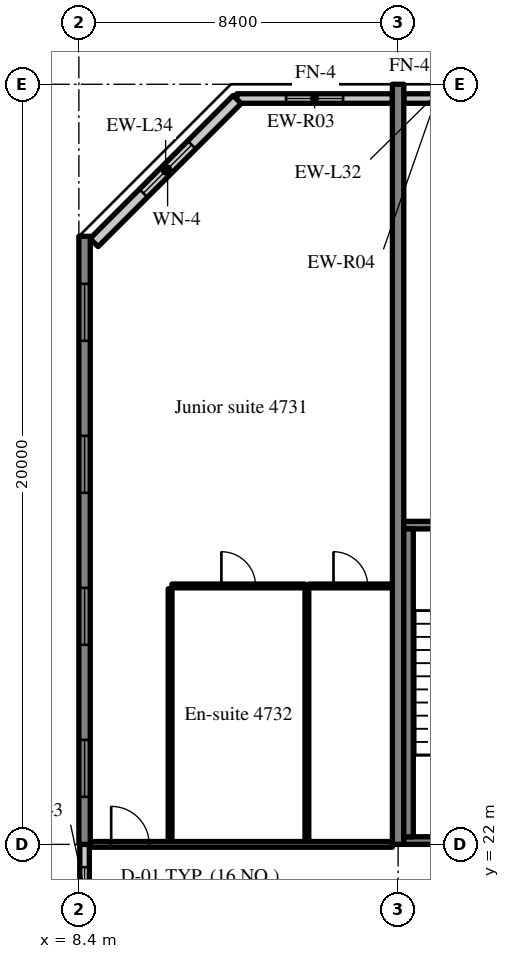
"""IFC4 building model, lengths in metres.
Left out: names, types, materials, properties, quantities, classifications, styles, units other than length and angle.
Written with IfcOpenShell. Run it as: python <this file> out.ifc"""

import sys

from ifc_helpers import new_model, si_unit, direction, frame, frame_2d, origin, place, context, subcontext, project, spatial, rectangle, extrude, source, transform, mapped, element, fill, save


model = new_model("IFC4")
c1 = context("Model", 3, precision=1e-05, world=origin(), true_north=direction((0.0, 1.0)))
c2 = subcontext(c1, "Body", "Model", "MODEL_VIEW")
j1 = project(units=[si_unit("LENGTHUNIT", "METRE"), si_unit("PLANEANGLEUNIT", "RADIAN")], contexts=[c1])
p1 = place(None, origin())
s1 = spatial("IfcSite", under=j1, at=p1, CompositionType="ELEMENT")
p2 = place(p1, origin())
s2 = spatial("IfcBuilding", under=s1, at=p2, CompositionType="ELEMENT")
p3 = place(p2, frame((0.0, 0.0, 193.4)))
s3 = spatial("IfcBuildingStorey", under=s2, at=p3, CompositionType="ELEMENT", Elevation=193.4)
m1 = source(origin(), c2, "Body", "SweptSolid", [
    extrude(rectangle(XDim=16.0, YDim=0.3, at=frame_2d((8.0, 0.0))), origin(), (0.0, 0.0, 1.0), 3.52),
])
p4 = place(p3, frame((8.55, 22.0, 0.0), z_axis=(0.0, 0.0, 1.0), x_axis=(0.0, 1.0, 0.0)))
e1 = element("IfcWall", 1, at=p4, inside=s3, PredefinedType="SHEAR", context=c2, shape_type="MappedRepresentation", body=[
    mapped(m1, transform((0.0, 0.0, 0.0), scale=1.0)),
])
m2 = source(origin(), c2, "Body", "SweptSolid", [
    extrude(rectangle(XDim=1.5, YDim=1.5, at=frame_2d((0.75, 0.75))), frame((0.0, 0.16, 0.0), z_axis=(0.0, -1.0, 0.0), x_axis=(1.0, 0.0, 0.0)), (0.0, 0.0, 1.0), 0.32),
])
p5 = place(p4, frame((1.25, 0.0, 0.9)))
e2 = element("IfcOpeningElement", 2, at=p5, cuts=e1, PredefinedType="OPENING", context=c2, shape_type="MappedRepresentation", body=[
    mapped(m2, transform((0.0, 0.0, 0.0), scale=1.0)),
])
p6 = place(p4, frame((5.25, 0.0, 0.9)))
e3 = element("IfcOpeningElement", 3, at=p6, cuts=e1, PredefinedType="OPENING", context=c2, shape_type="MappedRepresentation", body=[
    mapped(m2, transform((0.0, 0.0, 0.0), scale=1.0)),
])
p7 = place(p4, frame((9.25, 0.0, 0.9)))
e4 = element("IfcOpeningElement", 4, at=p7, cuts=e1, PredefinedType="OPENING", context=c2, shape_type="MappedRepresentation", body=[
    mapped(m2, transform((0.0, 0.0, 0.0), scale=1.0)),
])
p8 = place(p4, frame((13.25, 0.0, 0.9)))
e5 = element("IfcOpeningElement", 5, at=p8, cuts=e1, PredefinedType="OPENING", context=c2, shape_type="MappedRepresentation", body=[
    mapped(m2, transform((0.0, 0.0, 0.0), scale=1.0)),
])
m3 = source(origin(), c2, "Body", "SweptSolid", [
    extrude(rectangle(XDim=20.0, YDim=0.3, at=frame_2d((10.0, 0.0))), origin(), (0.0, 0.0, 1.0), 3.52),
])
p9 = place(p3, frame((16.8, 22.0, 0.0), z_axis=(0.0, 0.0, 1.0), x_axis=(0.0, 1.0, 0.0)))
e6 = element("IfcWall", 6, at=p9, inside=s3, PredefinedType="SHEAR", context=c2, shape_type="MappedRepresentation", body=[
    mapped(m3, transform((0.0, 0.0, 0.0), scale=1.0)),
])
m4 = source(origin(), c2, "Body", "SweptSolid", [
    extrude(rectangle(XDim=4.094, YDim=0.25, at=frame_2d((2.047, 0.0))), origin(), (0.0, 0.0, 1.0), 2.87),
])
p10 = place(p3, frame((16.65, 41.625, 0.0), z_axis=(0.0, 0.0, 1.0), x_axis=(-1.0, 0.0, 0.0)))
e7 = element("IfcWall", 7, at=p10, inside=s3, PredefinedType="SOLIDWALL", context=c2, shape_type="MappedRepresentation", body=[
    mapped(m4, transform((0.0, 0.0, 0.0), scale=1.0)),
])
m5 = source(origin(), c2, "Body", "SweptSolid", [
    extrude(rectangle(XDim=1.5, YDim=1.5, at=frame_2d((0.75, 0.75))), frame((0.0, 0.135, 0.0), z_axis=(0.0, -1.0, 0.0), x_axis=(1.0, 0.0, 0.0)), (0.0, 0.0, 1.0), 0.27),
])
p11 = place(p10, frame((1.297, 0.0, 0.9)))
e8 = element("IfcOpeningElement", 8, at=p11, cuts=e7, PredefinedType="OPENING", context=c2, shape_type="MappedRepresentation", body=[
    mapped(m5, transform((0.0, 0.0, 0.0), scale=1.0)),
])
m6 = source(origin(), c2, "Body", "SweptSolid", [
    extrude(rectangle(XDim=1.708, YDim=0.25, at=frame_2d((0.854, 0.0))), origin(), (0.0, 0.0, 1.0), 2.87),
])
p12 = place(p3, frame((18.658, 41.625, 0.0), z_axis=(0.0, 0.0, 1.0), x_axis=(-1.0, 0.0, 0.0)))
e9 = element("IfcWall", 9, at=p12, inside=s3, PredefinedType="SOLIDWALL", context=c2, shape_type="MappedRepresentation", body=[
    mapped(m6, transform((0.0, 0.0, 0.0), scale=1.0)),
])
m7 = source(origin(), c2, "Body", "SweptSolid", [
    extrude(rectangle(XDim=5.326, YDim=0.3, at=frame_2d((2.663, 0.0))), origin(), (0.0, 0.0, 1.0), 3.52),
])
p13 = place(p3, frame((12.566, 41.6, 0.0), z_axis=(0.0, 0.0, 1.0), x_axis=(-0.707083859269, -0.707129702361, 0.0)))
e10 = element("IfcWall", 10, at=p13, inside=s3, PredefinedType="SOLIDWALL", context=c2, shape_type="MappedRepresentation", body=[
    mapped(m7, transform((0.0, 0.0, 0.0), scale=1.0)),
])
m8 = source(origin(), c2, "Body", "SweptSolid", [
    extrude(rectangle(XDim=1.8, YDim=1.5, at=frame_2d((0.9, 0.75))), frame((0.0, 0.16, 0.0), z_axis=(0.0, -1.0, 0.0), x_axis=(1.0, 0.0, 0.0)), (0.0, 0.0, 1.0), 0.32),
])
p14 = place(p13, frame((1.689, 0.0, 0.9)))
e11 = element("IfcOpeningElement", 11, at=p14, cuts=e10, PredefinedType="OPENING", context=c2, shape_type="MappedRepresentation", body=[
    mapped(m8, transform((0.0, 0.0, 0.0), scale=1.0)),
])
m9 = source(origin(), c2, "Body", "SweptSolid", [
    extrude(rectangle(XDim=2.4, YDim=0.25, at=frame_2d((1.2, 0.0))), origin(), (0.0, 0.0, 1.0), 2.62),
])
p15 = place(p3, frame((8.55, 19.6, 0.0), z_axis=(0.0, 0.0, 1.0), x_axis=(0.0, 1.0, 0.0)))
e12 = element("IfcWall", 12, at=p15, inside=s3, PredefinedType="SOLIDWALL", context=c2, shape_type="MappedRepresentation", body=[
    mapped(m9, transform((0.0, 0.0, 0.0), scale=1.0)),
])
m10 = source(origin(), c2, "Body", "SweptSolid", [
    extrude(rectangle(XDim=1.2, YDim=1.5, at=frame_2d((0.6, 0.75))), frame((0.0, 0.135, 0.0), z_axis=(0.0, -1.0, 0.0), x_axis=(1.0, 0.0, 0.0)), (0.0, 0.0, 1.0), 0.27),
])
p16 = place(p15, frame((0.6, 0.0, 0.9)))
e13 = element("IfcOpeningElement", 13, at=p16, cuts=e12, PredefinedType="OPENING", context=c2, shape_type="MappedRepresentation", body=[
    mapped(m10, transform((0.0, 0.0, 0.0), scale=1.0)),
])
m11 = source(origin(), c2, "Body", "SweptSolid", [
    extrude(rectangle(XDim=8.25, YDim=0.2, at=frame_2d((4.125, 0.0))), origin(), (0.0, 0.0, 1.0), 3.52),
])
p17 = place(p3, frame((16.95, 22.1, 0.0), z_axis=(0.0, 0.0, 1.0), x_axis=(1.0, 0.0, 0.0)))
e14 = element("IfcWall", 14, at=p17, inside=s3, PredefinedType="SOLIDWALL", context=c2, shape_type="MappedRepresentation", body=[
    mapped(m11, transform((0.0, 0.0, 0.0), scale=1.0)),
])
m12 = source(origin(), c2, "Body", "SweptSolid", [
    extrude(rectangle(XDim=1.2, YDim=2.1, at=frame_2d((0.6, 1.05))), frame((0.0, 0.11, 0.0), z_axis=(0.0, -1.0, 0.0), x_axis=(1.0, 0.0, 0.0)), (0.0, 0.0, 1.0), 0.22),
])
p18 = place(p17, frame((6.05, 0.0, 0.0)))
e15 = element("IfcOpeningElement", 15, at=p18, cuts=e14, PredefinedType="OPENING", context=c2, shape_type="MappedRepresentation", body=[
    mapped(m12, transform((0.0, 0.0, 0.0), scale=1.0)),
])
p19 = place(p3, frame((16.95, 30.4, 0.0), z_axis=(0.0, 0.0, 1.0), x_axis=(1.0, 0.0, 0.0)))
e16 = element("IfcWall", 16, at=p19, inside=s3, PredefinedType="SOLIDWALL", context=c2, shape_type="MappedRepresentation", body=[
    mapped(m11, transform((0.0, 0.0, 0.0), scale=1.0)),
])
m13 = source(origin(), c2, "Body", "SweptSolid", [
    extrude(rectangle(XDim=1.0, YDim=2.1, at=frame_2d((0.5, 1.05))), frame((0.0, 0.11, 0.0), z_axis=(0.0, -1.0, 0.0), x_axis=(1.0, 0.0, 0.0)), (0.0, 0.0, 1.0), 0.22),
])
p20 = place(p19, frame((6.15, 0.0, 0.0)))
e17 = element("IfcOpeningElement", 17, at=p20, cuts=e16, PredefinedType="OPENING", context=c2, shape_type="MappedRepresentation", body=[
    mapped(m13, transform((0.0, 0.0, 0.0), scale=1.0)),
])
m14 = source(origin(), c2, "Body", "SweptSolid", [
    extrude(rectangle(XDim=8.1, YDim=0.25, at=frame_2d((4.05, 0.0))), origin(), (0.0, 0.0, 1.0), 3.52),
])
p21 = place(p3, frame((17.075, 22.2, 0.0), z_axis=(0.0, 0.0, 1.0), x_axis=(0.0, 1.0, 0.0)))
e18 = element("IfcWall", 18, at=p21, inside=s3, PredefinedType="SOLIDWALL", context=c2, shape_type="MappedRepresentation", body=[
    mapped(m14, transform((0.0, 0.0, 0.0), scale=1.0)),
])
m15 = source(origin(), c2, "Body", "SweptSolid", [
    extrude(rectangle(XDim=6.65, YDim=0.1, at=frame_2d((3.325, 0.0))), origin(), (0.0, 0.0, 1.0), 3.52),
])
for number, where, z_axis, x_axis in (
    (19, (10.8, 22.075, 0.0), (0.0, 0.0, 1.0), (0.0, 1.0, 0.0)),
    (20, (14.4, 22.075, 0.0), (0.0, 0.0, 1.0), (0.0, 1.0, 0.0)),
):
    element("IfcWall", number, at=place(p3, frame(where, z_axis=z_axis, x_axis=x_axis)), inside=s3, PredefinedType="PARTITIONING", context=c2, shape_type="MappedRepresentation", body=[
        mapped(m15, transform((0.0, 0.0, 0.0), scale=1.0)),
    ])
m16 = source(origin(), c2, "Body", "SweptSolid", [
    extrude(rectangle(XDim=3.5, YDim=0.1, at=frame_2d((1.75, 0.0))), origin(), (0.0, 0.0, 1.0), 3.52),
])
p22 = place(p3, frame((10.85, 28.8, 0.0), z_axis=(0.0, 0.0, 1.0), x_axis=(1.0, 0.0, 0.0)))
e21 = element("IfcWall", 21, at=p22, inside=s3, PredefinedType="PARTITIONING", context=c2, shape_type="MappedRepresentation", body=[
    mapped(m16, transform((0.0, 0.0, 0.0), scale=1.0)),
])
m17 = source(origin(), c2, "Body", "SweptSolid", [
    extrude(rectangle(XDim=0.9, YDim=2.1, at=frame_2d((0.45, 1.05))), frame((0.0, 0.06, 0.0), z_axis=(0.0, -1.0, 0.0), x_axis=(1.0, 0.0, 0.0)), (0.0, 0.0, 1.0), 0.12),
])
p23 = place(p22, frame((1.3, 0.0, 0.0)))
e22 = element("IfcOpeningElement", 22, at=p23, cuts=e21, PredefinedType="OPENING", context=c2, shape_type="MappedRepresentation", body=[
    mapped(m17, transform((0.0, 0.0, 0.0), scale=1.0)),
])
m18 = source(origin(), c2, "Body", "SweptSolid", [
    extrude(rectangle(XDim=2.2, YDim=0.1, at=frame_2d((1.1, 0.0))), origin(), (0.0, 0.0, 1.0), 3.52),
])
p24 = place(p3, frame((14.45, 28.8, 0.0), z_axis=(0.0, 0.0, 1.0), x_axis=(1.0, 0.0, 0.0)))
e23 = element("IfcWall", 23, at=p24, inside=s3, PredefinedType="PARTITIONING", context=c2, shape_type="MappedRepresentation", body=[
    mapped(m18, transform((0.0, 0.0, 0.0), scale=1.0)),
])
p25 = place(p24, frame((0.65, 0.0, 0.0)))
e24 = element("IfcOpeningElement", 24, at=p25, cuts=e23, PredefinedType="OPENING", context=c2, shape_type="MappedRepresentation", body=[
    mapped(m17, transform((0.0, 0.0, 0.0), scale=1.0)),
])
m19 = source(origin(), c2, "Body", "SweptSolid", [
    extrude(rectangle(XDim=7.95, YDim=0.15, at=frame_2d((3.975, 0.0))), origin(), (0.0, 0.0, 1.0), 2.82),
])
p26 = place(p3, frame((8.7, 22.0, 0.0), z_axis=(0.0, 0.0, 1.0), x_axis=(1.0, 0.0, 0.0)))
e25 = element("IfcWall", 25, at=p26, inside=s3, PredefinedType="PARTITIONING", context=c2, shape_type="MappedRepresentation", body=[
    mapped(m19, transform((0.0, 0.0, 0.0), scale=1.0)),
])
m20 = source(origin(), c2, "Body", "SweptSolid", [
    extrude(rectangle(XDim=1.0, YDim=2.1, at=frame_2d((0.5, 1.05))), frame((0.0, 0.085, 0.0), z_axis=(0.0, -1.0, 0.0), x_axis=(1.0, 0.0, 0.0)), (0.0, 0.0, 1.0), 0.17),
])
p27 = place(p26, frame((0.55, 0.0, 0.0)))
e26 = element("IfcOpeningElement", 26, at=p27, cuts=e25, PredefinedType="OPENING", context=c2, shape_type="MappedRepresentation", body=[
    mapped(m20, transform((0.0, 0.0, 0.0), scale=1.0)),
])
m21 = source(origin(), c2, "Body", "SweptSolid", [
    extrude(rectangle(XDim=1.5, YDim=1.5, at=frame_2d((0.75, 0.75))), frame((0.0, 0.03, 0.0), z_axis=(0.0, -1.0, 0.0), x_axis=(1.0, 0.0, 0.0)), (0.0, 0.0, 1.0), 0.06),
])
p28 = place(p11, origin())
e27 = element("IfcWindow", 27, at=p28, inside=s3, PartitioningType="SINGLE_PANEL", PredefinedType="WINDOW", context=c2, shape_type="MappedRepresentation", body=[
    mapped(m21, transform((0.0, 0.0, 0.0), scale=1.0)),
])
fill(e8, e27)
m22 = source(origin(), c2, "Body", "SweptSolid", [
    extrude(rectangle(XDim=1.8, YDim=1.5, at=frame_2d((0.9, 0.75))), frame((0.0, 0.03, 0.0), z_axis=(0.0, -1.0, 0.0), x_axis=(1.0, 0.0, 0.0)), (0.0, 0.0, 1.0), 0.06),
])
p29 = place(p14, origin())
e28 = element("IfcWindow", 28, at=p29, inside=s3, PartitioningType="SINGLE_PANEL", PredefinedType="WINDOW", context=c2, shape_type="MappedRepresentation", body=[
    mapped(m22, transform((0.0, 0.0, 0.0), scale=1.0)),
])
fill(e11, e28)
p30 = place(p5, origin())
e29 = element("IfcWindow", 29, at=p30, inside=s3, PartitioningType="SINGLE_PANEL", PredefinedType="WINDOW", context=c2, shape_type="MappedRepresentation", body=[
    mapped(m21, transform((0.0, 0.0, 0.0), scale=1.0)),
])
fill(e2, e29)
p31 = place(p6, origin())
e30 = element("IfcWindow", 30, at=p31, inside=s3, PartitioningType="SINGLE_PANEL", PredefinedType="WINDOW", context=c2, shape_type="MappedRepresentation", body=[
    mapped(m21, transform((0.0, 0.0, 0.0), scale=1.0)),
])
fill(e3, e30)
p32 = place(p7, origin())
e31 = element("IfcWindow", 31, at=p32, inside=s3, PartitioningType="SINGLE_PANEL", PredefinedType="WINDOW", context=c2, shape_type="MappedRepresentation", body=[
    mapped(m21, transform((0.0, 0.0, 0.0), scale=1.0)),
])
fill(e4, e31)
p33 = place(p8, origin())
e32 = element("IfcWindow", 32, at=p33, inside=s3, PartitioningType="SINGLE_PANEL", PredefinedType="WINDOW", context=c2, shape_type="MappedRepresentation", body=[
    mapped(m21, transform((0.0, 0.0, 0.0), scale=1.0)),
])
fill(e5, e32)
m23 = source(origin(), c2, "Body", "SweptSolid", [
    extrude(rectangle(XDim=1.2, YDim=1.5, at=frame_2d((0.6, 0.75))), frame((0.0, 0.03, 0.0), z_axis=(0.0, -1.0, 0.0), x_axis=(1.0, 0.0, 0.0)), (0.0, 0.0, 1.0), 0.06),
])
p34 = place(p16, origin())
e33 = element("IfcWindow", 33, at=p34, inside=s3, PartitioningType="SINGLE_PANEL", PredefinedType="WINDOW", context=c2, shape_type="MappedRepresentation", body=[
    mapped(m23, transform((0.0, 0.0, 0.0), scale=1.0)),
])
fill(e13, e33)
m24 = source(origin(), c2, "Body", "SweptSolid", [
    extrude(rectangle(XDim=0.9, YDim=2.1, at=frame_2d((0.45, 1.05))), frame((0.0, 0.025, 0.0), z_axis=(0.0, -1.0, 0.0), x_axis=(1.0, 0.0, 0.0)), (0.0, 0.0, 1.0), 0.05),
])
p35 = place(p23, origin())
e34 = element("IfcDoor", 34, at=p35, inside=s3, OperationType="SINGLE_SWING_LEFT", PredefinedType="DOOR", context=c2, shape_type="MappedRepresentation", body=[
    mapped(m24, transform((0.0, 0.0, 0.0), scale=1.0)),
])
fill(e22, e34)
p36 = place(p25, origin())
e35 = element("IfcDoor", 35, at=p36, inside=s3, OperationType="SINGLE_SWING_LEFT", PredefinedType="DOOR", context=c2, shape_type="MappedRepresentation", body=[
    mapped(m24, transform((0.0, 0.0, 0.0), scale=1.0)),
])
fill(e24, e35)
m25 = source(origin(), c2, "Body", "SweptSolid", [
    extrude(rectangle(XDim=1.0, YDim=2.1, at=frame_2d((0.5, 1.05))), frame((0.0, 0.025, 0.0), z_axis=(0.0, -1.0, 0.0), x_axis=(1.0, 0.0, 0.0)), (0.0, 0.0, 1.0), 0.05),
])
p37 = place(p27, origin())
e36 = element("IfcDoor", 36, at=p37, inside=s3, OperationType="SINGLE_SWING_LEFT", PredefinedType="DOOR", context=c2, shape_type="MappedRepresentation", body=[
    mapped(m25, transform((0.0, 0.0, 0.0), scale=1.0)),
])
fill(e26, e36)
save(model, sys.argv[1])
